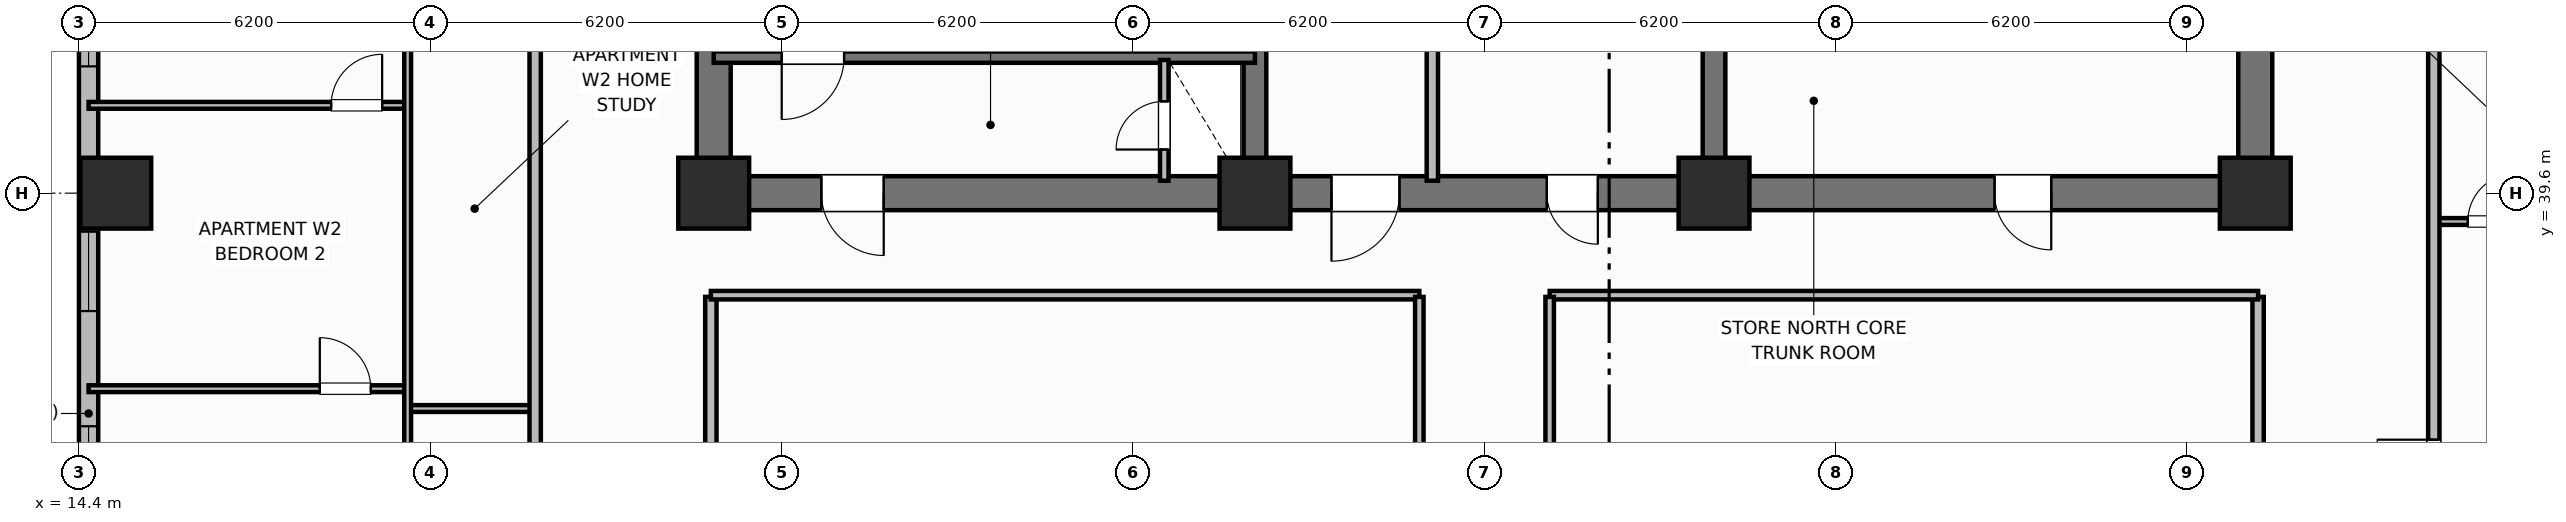
"""IFC4 building model, lengths in metres.
Left out: names, types, materials, properties, quantities, classifications, styles, units other than length and angle.
Written with IfcOpenShell. Run it as: python <this file> out.ifc"""

import sys

from ifc_helpers import new_model, si_unit, direction, frame, frame_2d, origin, origin_2d, place, context, subcontext, project, spatial, rectangle, extrude, element, fill, save


model = new_model("IFC4")
c1 = context("Model", 3, precision=1e-05, world=origin(), true_north=direction((0.0, 1.0)))
c2 = subcontext(c1, "Body", "Model", "MODEL_VIEW")
j1 = project(units=[si_unit("LENGTHUNIT", "METRE"), si_unit("PLANEANGLEUNIT", "RADIAN")], contexts=[c1])
p1 = place(None, origin())
s1 = spatial("IfcSite", under=j1, at=p1, CompositionType="ELEMENT")
p2 = place(p1, origin())
s2 = spatial("IfcBuilding", under=s1, at=p2, CompositionType="ELEMENT")
p3 = place(p2, frame((0.0, 0.0, 28.8)))
s3 = spatial("IfcBuildingStorey", under=s2, at=p3, CompositionType="ELEMENT", Elevation=28.8)
for number, where, z_axis, x_axis in (
    (1, (25.6, 39.9, 0.0), (0.0, 0.0, 1.0), (0.0, 1.0, 0.0)),
    (2, (52.8, 39.9, 0.0), (0.0, 0.0, 1.0), (0.0, 1.0, 0.0)),
):
    element("IfcWall", number, at=place(p3, frame(where, z_axis=z_axis, x_axis=x_axis)), inside=s3, PredefinedType="SHEAR", context=c2, shape_type="SweptSolid", body=[
        extrude(rectangle(XDim=5.6, YDim=0.6, at=frame_2d((2.8, 0.0))), origin(), (0.0, 0.0, 1.0), 3.7),
    ])
p4 = place(p3, frame((52.8, 39.6, 0.0), z_axis=(0.0, 0.0, 1.0), x_axis=(-1.0, 0.0, 0.0)))
e3 = element("IfcWall", 3, at=p4, inside=s3, PredefinedType="SHEAR", context=c2, shape_type="SweptSolid", body=[
    extrude(rectangle(XDim=27.2, YDim=0.6, at=frame_2d((13.6, 0.0))), origin(), (0.0, 0.0, 1.0), 3.7),
])
p5 = place(p4, frame((24.2, 0.0, 0.0)))
e4 = element("IfcOpeningElement", 4, at=p5, cuts=e3, PredefinedType="OPENING", context=c2, shape_type="SweptSolid", body=[
    extrude(rectangle(XDim=1.1, YDim=2.15, at=frame_2d((0.55, 1.075))), frame((0.0, 0.31, 0.0), z_axis=(0.0, -1.0, 0.0), x_axis=(1.0, 0.0, 0.0)), (0.0, 0.0, 1.0), 0.62),
])
p6 = place(p4, frame((15.1, 0.0, 0.0)))
e5 = element("IfcOpeningElement", 5, at=p6, cuts=e3, PredefinedType="OPENING", context=c2, shape_type="SweptSolid", body=[
    extrude(rectangle(XDim=1.2, YDim=2.15, at=frame_2d((0.6, 1.075))), frame((0.0, 0.31, 0.0), z_axis=(0.0, -1.0, 0.0), x_axis=(1.0, 0.0, 0.0)), (0.0, 0.0, 1.0), 0.62),
])
p7 = place(p4, frame((11.6, 0.0, 0.0)))
e6 = element("IfcOpeningElement", 6, at=p7, cuts=e3, PredefinedType="OPENING", context=c2, shape_type="SweptSolid", body=[
    extrude(rectangle(XDim=0.9, YDim=2.1, at=frame_2d((0.45, 1.05))), frame((0.0, 0.31, 0.0), z_axis=(0.0, -1.0, 0.0), x_axis=(1.0, 0.0, 0.0)), (0.0, 0.0, 1.0), 0.62),
])
p8 = place(p4, frame((3.6, 0.0, 0.0)))
e7 = element("IfcOpeningElement", 7, at=p8, cuts=e3, PredefinedType="OPENING", context=c2, shape_type="SweptSolid", body=[
    extrude(rectangle(XDim=1.0, YDim=2.15, at=frame_2d((0.5, 1.075))), frame((0.0, 0.31, 0.0), z_axis=(0.0, -1.0, 0.0), x_axis=(1.0, 0.0, 0.0)), (0.0, 0.0, 1.0), 0.62),
])
for number, where, z_axis, x_axis in (
    (8, (35.15, 39.9, 0.0), (0.0, 0.0, 1.0), (0.0, 1.0, 0.0)),
    (9, (43.25, 39.9, 0.0), (0.0, 0.0, 1.0), (0.0, 1.0, 0.0)),
):
    element("IfcWall", number, at=place(p3, frame(where, z_axis=z_axis, x_axis=x_axis)), inside=s3, PredefinedType="SHEAR", context=c2, shape_type="SweptSolid", body=[
        extrude(rectangle(XDim=5.6, YDim=0.4, at=frame_2d((2.8, 0.0))), origin(), (0.0, 0.0, 1.0), 3.7),
    ])
for number, where, z_axis, x_axis in (
    (10, (25.6, 39.6, 0.0), (0.0, 0.0, 1.0), (1.0, 0.0, 0.0)),
    (11, (35.15, 39.6, 0.0), (0.0, 0.0, 1.0), (1.0, 0.0, 0.0)),
    (12, (43.25, 39.6, 0.0), (0.0, 0.0, 1.0), (1.0, 0.0, 0.0)),
    (13, (52.8, 39.6, 0.0), (0.0, 0.0, 1.0), (1.0, 0.0, 0.0)),
    (14, (15.05, 39.6, 0.0), (0.0, 0.0, 1.0), (1.0, 0.0, 0.0)),
):
    element("IfcColumn", number, at=place(p3, frame(where, z_axis=z_axis, x_axis=x_axis)), inside=s3, PredefinedType="COLUMN", context=c2, shape_type="SweptSolid", body=[
        extrude(rectangle(XDim=1.25, YDim=1.25, at=origin_2d()), origin(), (0.0, 0.0, 1.0), 3.7),
    ])
p9 = place(p3, frame((14.57, 47.4, 0.0), z_axis=(0.0, 0.0, 1.0), x_axis=(0.0, -1.0, 0.0)))
e15 = element("IfcWall", 15, at=p9, inside=s3, PredefinedType="SOLIDWALL", context=c2, shape_type="SweptSolid", body=[
    extrude(rectangle(XDim=14.8, YDim=0.34, at=frame_2d((7.4, 0.0))), origin(), (0.0, 0.0, 1.0), 2.7),
])
p10 = place(p9, frame((3.762, 0.0, 0.73)))
e16 = element("IfcOpeningElement", 16, at=p10, cuts=e15, PredefinedType="OPENING", context=c2, shape_type="SweptSolid", body=[
    extrude(rectangle(XDim=1.8, YDim=1.85, at=frame_2d((0.9, 0.925))), frame((0.0, 0.18, 0.0), z_axis=(0.0, -1.0, 0.0), x_axis=(1.0, 0.0, 0.0)), (0.0, 0.0, 1.0), 0.36),
])
p11 = place(p9, frame((8.48, 0.0, 0.69)))
e17 = element("IfcOpeningElement", 17, at=p11, cuts=e15, PredefinedType="OPENING", context=c2, shape_type="SweptSolid", body=[
    extrude(rectangle(XDim=1.4, YDim=1.85, at=frame_2d((0.7, 0.925))), frame((0.0, 0.18, 0.0), z_axis=(0.0, -1.0, 0.0), x_axis=(1.0, 0.0, 0.0)), (0.0, 0.0, 1.0), 0.36),
])
p12 = place(p9, frame((11.913, 0.0, 0.73)))
e18 = element("IfcOpeningElement", 18, at=p12, cuts=e15, PredefinedType="OPENING", context=c2, shape_type="SweptSolid", body=[
    extrude(rectangle(XDim=1.8, YDim=1.85, at=frame_2d((0.9, 0.925))), frame((0.0, 0.18, 0.0), z_axis=(0.0, -1.0, 0.0), x_axis=(1.0, 0.0, 0.0)), (0.0, 0.0, 1.0), 0.36),
])
p13 = place(p3, frame((35.15, 42.0, 0.0), z_axis=(0.0, 0.0, 1.0), x_axis=(-1.0, 0.0, 0.0)))
e19 = element("IfcWall", 19, at=p13, inside=s3, PredefinedType="SHEAR", context=c2, shape_type="SweptSolid", body=[
    extrude(rectangle(XDim=9.55, YDim=0.2, at=frame_2d((4.775, 0.0))), origin(), (0.0, 0.0, 1.0), 3.7),
])
p14 = place(p13, frame((7.25, 0.0, 0.0)))
e20 = element("IfcOpeningElement", 20, at=p14, cuts=e19, PredefinedType="OPENING", context=c2, shape_type="SweptSolid", body=[
    extrude(rectangle(XDim=1.1, YDim=2.15, at=frame_2d((0.55, 1.075))), frame((0.0, 0.11, 0.0), z_axis=(0.0, -1.0, 0.0), x_axis=(1.0, 0.0, 0.0)), (0.0, 0.0, 1.0), 0.22),
])
p15 = place(p3, frame((33.55, 39.82, 0.0), z_axis=(0.0, 0.0, 1.0), x_axis=(0.0, 1.0, 0.0)))
e21 = element("IfcWall", 21, at=p15, inside=s3, PredefinedType="PARTITIONING", context=c2, shape_type="SweptSolid", body=[
    extrude(rectangle(XDim=2.13, YDim=0.15, at=frame_2d((1.065, 0.0))), origin(), (0.0, 0.0, 1.0), 2.53),
])
p16 = place(p15, frame((0.55, 0.0, 0.0)))
e22 = element("IfcOpeningElement", 22, at=p16, cuts=e21, PredefinedType="OPENING", context=c2, shape_type="SweptSolid", body=[
    extrude(rectangle(XDim=0.85, YDim=2.05, at=frame_2d((0.425, 1.025))), frame((0.0, 0.085, 0.0), z_axis=(0.0, -1.0, 0.0), x_axis=(1.0, 0.0, 0.0)), (0.0, 0.0, 1.0), 0.17),
])
p17 = place(p3, frame((38.28, 39.82, 0.0), z_axis=(0.0, 0.0, 1.0), x_axis=(0.0, 1.0, 0.0)))
e23 = element("IfcWall", 23, at=p17, inside=s3, PredefinedType="PARTITIONING", context=c2, shape_type="SweptSolid", body=[
    extrude(rectangle(XDim=2.73, YDim=0.2, at=frame_2d((1.365, 0.0))), origin(), (0.0, 0.0, 1.0), 2.53),
])
for number, where, z_axis, x_axis in (
    (24, (25.55, 18.63, 0.0), (0.0, 0.0, 1.0), (0.0, 1.0, 0.0)),
    (25, (52.85, 18.63, 0.0), (0.0, 0.0, 1.0), (0.0, 1.0, 0.0)),
):
    element("IfcWall", number, at=place(p3, frame(where, z_axis=z_axis, x_axis=x_axis)), inside=s3, PredefinedType="PARTITIONING", context=c2, shape_type="SweptSolid", body=[
        extrude(rectangle(XDim=19.14, YDim=0.2, at=frame_2d((9.57, 0.0))), origin(), (0.0, 0.0, 1.0), 2.53),
    ])
for number, where, z_axis, x_axis in (
    (26, (25.55, 37.8, 0.0), (0.0, 0.0, 1.0), (1.0, 0.0, 0.0)),
    (27, (40.35, 37.8, 0.0), (0.0, 0.0, 1.0), (1.0, 0.0, 0.0)),
):
    element("IfcWall", number, at=place(p3, frame(where, z_axis=z_axis, x_axis=x_axis)), inside=s3, PredefinedType="PARTITIONING", context=c2, shape_type="SweptSolid", body=[
        extrude(rectangle(XDim=12.5, YDim=0.15, at=frame_2d((6.25, 0.0))), origin(), (0.0, 0.0, 1.0), 2.53),
    ])
p18 = place(p3, frame((38.05, 18.63, 0.0), z_axis=(0.0, 0.0, 1.0), x_axis=(0.0, 1.0, 0.0)))
e28 = element("IfcWall", 28, at=p18, inside=s3, PredefinedType="PARTITIONING", context=c2, shape_type="SweptSolid", body=[
    extrude(rectangle(XDim=19.14, YDim=0.15, at=frame_2d((9.57, 0.0))), origin(), (0.0, 0.0, 1.0), 2.53),
])
p19 = place(p18, frame((5.5, 0.0, 0.0)))
e29 = element("IfcOpeningElement", 29, at=p19, cuts=e28, PredefinedType="OPENING", context=c2, shape_type="SweptSolid", body=[
    extrude(rectangle(XDim=1.0, YDim=2.15, at=frame_2d((0.5, 1.075))), frame((0.0, 0.085, 0.0), z_axis=(0.0, -1.0, 0.0), x_axis=(1.0, 0.0, 0.0)), (0.0, 0.0, 1.0), 0.17),
])
p20 = place(p3, frame((40.35, 18.63, 0.0), z_axis=(0.0, 0.0, 1.0), x_axis=(0.0, 1.0, 0.0)))
e30 = element("IfcWall", 30, at=p20, inside=s3, PredefinedType="PARTITIONING", context=c2, shape_type="SweptSolid", body=[
    extrude(rectangle(XDim=19.14, YDim=0.15, at=frame_2d((9.57, 0.0))), origin(), (0.0, 0.0, 1.0), 2.53),
])
p21 = place(p20, frame((5.5, 0.0, 0.0)))
e31 = element("IfcOpeningElement", 31, at=p21, cuts=e30, PredefinedType="OPENING", context=c2, shape_type="SweptSolid", body=[
    extrude(rectangle(XDim=1.0, YDim=2.15, at=frame_2d((0.5, 1.075))), frame((0.0, 0.085, 0.0), z_axis=(0.0, -1.0, 0.0), x_axis=(1.0, 0.0, 0.0)), (0.0, 0.0, 1.0), 0.17),
])
p22 = place(p3, frame((20.2, 35.8, 0.0), z_axis=(0.0, 0.0, 1.0), x_axis=(1.0, 0.0, 0.0)))
e32 = element("IfcWall", 32, at=p22, inside=s3, PredefinedType="PARTITIONING", context=c2, shape_type="SweptSolid", body=[
    extrude(rectangle(XDim=2.25, YDim=0.12, at=frame_2d((1.125, 0.0))), origin(), (0.0, 0.0, 1.0), 2.53),
])
p23 = place(p3, frame((14.57, 36.15, 0.0), z_axis=(0.0, 0.0, 1.0), x_axis=(1.0, 0.0, 0.0)))
e33 = element("IfcWall", 33, at=p23, inside=s3, PredefinedType="PARTITIONING", context=c2, shape_type="SweptSolid", body=[
    extrude(rectangle(XDim=5.63, YDim=0.12, at=frame_2d((2.815, 0.0))), origin(), (0.0, 0.0, 1.0), 2.53),
])
p24 = place(p23, frame((4.08, 0.0, 0.0)))
e34 = element("IfcOpeningElement", 34, at=p24, cuts=e33, PredefinedType="OPENING", context=c2, shape_type="SweptSolid", body=[
    extrude(rectangle(XDim=0.9, YDim=2.1, at=frame_2d((0.45, 1.05))), frame((0.0, 0.07, 0.0), z_axis=(0.0, -1.0, 0.0), x_axis=(1.0, 0.0, 0.0)), (0.0, 0.0, 1.0), 0.14),
])
p25 = place(p3, frame((14.57, 41.15, 0.0), z_axis=(0.0, 0.0, 1.0), x_axis=(1.0, 0.0, 0.0)))
e35 = element("IfcWall", 35, at=p25, inside=s3, PredefinedType="PARTITIONING", context=c2, shape_type="SweptSolid", body=[
    extrude(rectangle(XDim=5.63, YDim=0.12, at=frame_2d((2.815, 0.0))), origin(), (0.0, 0.0, 1.0), 2.53),
])
p26 = place(p25, frame((4.28, 0.0, 0.0)))
e36 = element("IfcOpeningElement", 36, at=p26, cuts=e35, PredefinedType="OPENING", context=c2, shape_type="SweptSolid", body=[
    extrude(rectangle(XDim=0.9, YDim=2.1, at=frame_2d((0.45, 1.05))), frame((0.0, 0.07, 0.0), z_axis=(0.0, -1.0, 0.0), x_axis=(1.0, 0.0, 0.0)), (0.0, 0.0, 1.0), 0.14),
])
p27 = place(p3, frame((20.2, 26.64, 0.0), z_axis=(0.0, 0.0, 1.0), x_axis=(0.0, 1.0, 0.0)))
e37 = element("IfcWall", 37, at=p27, inside=s3, PredefinedType="PARTITIONING", context=c2, shape_type="SweptSolid", body=[
    extrude(rectangle(XDim=19.12, YDim=0.12, at=frame_2d((9.56, 0.0))), origin(), (0.0, 0.0, 1.0), 2.53),
])
p28 = place(p27, frame((2.81, 0.0, 0.0)))
e38 = element("IfcOpeningElement", 38, at=p28, cuts=e37, PredefinedType="OPENING", context=c2, shape_type="SweptSolid", body=[
    extrude(rectangle(XDim=0.9, YDim=2.1, at=frame_2d((0.45, 1.05))), frame((0.0, 0.07, 0.0), z_axis=(0.0, -1.0, 0.0), x_axis=(1.0, 0.0, 0.0)), (0.0, 0.0, 1.0), 0.14),
])
p29 = place(p27, frame((16.18, 0.0, 0.0)))
e39 = element("IfcOpeningElement", 39, at=p29, cuts=e37, PredefinedType="OPENING", context=c2, shape_type="SweptSolid", body=[
    extrude(rectangle(XDim=0.82, YDim=2.08, at=frame_2d((0.41, 1.04))), frame((0.0, 0.07, 0.0), z_axis=(0.0, -1.0, 0.0), x_axis=(1.0, 0.0, 0.0)), (0.0, 0.0, 1.0), 0.14),
])
p30 = place(p3, frame((22.45, 10.6, 0.0), z_axis=(0.0, 0.0, 1.0), x_axis=(0.0, 1.0, 0.0)))
e40 = element("IfcWall", 40, at=p30, inside=s3, PredefinedType="PARTITIONING", context=c2, shape_type="SweptSolid", body=[
    extrude(rectangle(XDim=35.2, YDim=0.2, at=frame_2d((17.6, 0.0))), origin(), (0.0, 0.0, 1.0), 2.53),
])
p31 = place(p30, frame((2.65, 0.0, 0.0)))
e41 = element("IfcOpeningElement", 41, at=p31, cuts=e40, PredefinedType="OPENING", context=c2, shape_type="SweptSolid", body=[
    extrude(rectangle(XDim=1.0, YDim=2.15, at=frame_2d((0.5, 1.075))), frame((0.0, 0.11, 0.0), z_axis=(0.0, -1.0, 0.0), x_axis=(1.0, 0.0, 0.0)), (0.0, 0.0, 1.0), 0.22),
])
p32 = place(p30, frame((19.95, 0.0, 0.0)))
e42 = element("IfcOpeningElement", 42, at=p32, cuts=e40, PredefinedType="OPENING", context=c2, shape_type="SweptSolid", body=[
    extrude(rectangle(XDim=1.0, YDim=2.15, at=frame_2d((0.5, 1.075))), frame((0.0, 0.11, 0.0), z_axis=(0.0, -1.0, 0.0), x_axis=(1.0, 0.0, 0.0)), (0.0, 0.0, 1.0), 0.22),
])
p33 = place(p3, frame((55.95, 39.1, 0.0), z_axis=(0.0, 0.0, 1.0), x_axis=(1.0, 0.0, 0.0)))
e43 = element("IfcWall", 43, at=p33, inside=s3, PredefinedType="PARTITIONING", context=c2, shape_type="SweptSolid", body=[
    extrude(rectangle(XDim=2.25, YDim=0.12, at=frame_2d((1.125, 0.0))), origin(), (0.0, 0.0, 1.0), 2.53),
])
p34 = place(p33, frame((0.6, 0.0, 0.0)))
e44 = element("IfcOpeningElement", 44, at=p34, cuts=e43, PredefinedType="OPENING", context=c2, shape_type="SweptSolid", body=[
    extrude(rectangle(XDim=0.85, YDim=2.1, at=frame_2d((0.425, 1.05))), frame((0.0, 0.07, 0.0), z_axis=(0.0, -1.0, 0.0), x_axis=(1.0, 0.0, 0.0)), (0.0, 0.0, 1.0), 0.14),
])
p35 = place(p3, frame((55.95, 10.6, 0.0), z_axis=(0.0, 0.0, 1.0), x_axis=(0.0, 1.0, 0.0)))
e45 = element("IfcWall", 45, at=p35, inside=s3, PredefinedType="PARTITIONING", context=c2, shape_type="SweptSolid", body=[
    extrude(rectangle(XDim=35.2, YDim=0.2, at=frame_2d((17.6, 0.0))), origin(), (0.0, 0.0, 1.0), 2.53),
])
p36 = place(p35, frame((2.65, 0.0, 0.0)))
e46 = element("IfcOpeningElement", 46, at=p36, cuts=e45, PredefinedType="OPENING", context=c2, shape_type="SweptSolid", body=[
    extrude(rectangle(XDim=1.0, YDim=2.15, at=frame_2d((0.5, 1.075))), frame((0.0, 0.11, 0.0), z_axis=(0.0, -1.0, 0.0), x_axis=(1.0, 0.0, 0.0)), (0.0, 0.0, 1.0), 0.22),
])
p37 = place(p35, frame((12.518, 0.0, 0.0)))
e47 = element("IfcOpeningElement", 47, at=p37, cuts=e45, PredefinedType="OPENING", context=c2, shape_type="SweptSolid", body=[
    extrude(rectangle(XDim=1.0, YDim=2.15, at=frame_2d((0.5, 1.075))), frame((0.0, 0.11, 0.0), z_axis=(0.0, -1.0, 0.0), x_axis=(1.0, 0.0, 0.0)), (0.0, 0.0, 1.0), 0.22),
])
p38 = place(p35, frame((23.65, 0.0, 0.0)))
e48 = element("IfcOpeningElement", 48, at=p38, cuts=e45, PredefinedType="OPENING", context=c2, shape_type="SweptSolid", body=[
    extrude(rectangle(XDim=1.0, YDim=2.15, at=frame_2d((0.5, 1.075))), frame((0.0, 0.11, 0.0), z_axis=(0.0, -1.0, 0.0), x_axis=(1.0, 0.0, 0.0)), (0.0, 0.0, 1.0), 0.22),
])
p39 = place(p10, origin())
e49 = element("IfcWindow", 49, at=p39, inside=s3, PartitioningType="SINGLE_PANEL", PredefinedType="WINDOW", context=c2, shape_type="SweptSolid", body=[
    extrude(rectangle(XDim=1.8, YDim=1.85, at=frame_2d((0.9, 0.925))), frame((0.0, 0.03, 0.0), z_axis=(0.0, -1.0, 0.0), x_axis=(1.0, 0.0, 0.0)), (0.0, 0.0, 1.0), 0.06),
])
fill(e16, e49)
p40 = place(p11, origin())
e50 = element("IfcWindow", 50, at=p40, inside=s3, PartitioningType="SINGLE_PANEL", PredefinedType="WINDOW", context=c2, shape_type="SweptSolid", body=[
    extrude(rectangle(XDim=1.4, YDim=1.85, at=frame_2d((0.7, 0.925))), frame((0.0, 0.03, 0.0), z_axis=(0.0, -1.0, 0.0), x_axis=(1.0, 0.0, 0.0)), (0.0, 0.0, 1.0), 0.06),
])
fill(e17, e50)
p41 = place(p12, origin())
e51 = element("IfcWindow", 51, at=p41, inside=s3, PartitioningType="SINGLE_PANEL", PredefinedType="WINDOW", context=c2, shape_type="SweptSolid", body=[
    extrude(rectangle(XDim=1.8, YDim=1.85, at=frame_2d((0.9, 0.925))), frame((0.0, 0.03, 0.0), z_axis=(0.0, -1.0, 0.0), x_axis=(1.0, 0.0, 0.0)), (0.0, 0.0, 1.0), 0.06),
])
fill(e18, e51)
p42 = place(p14, origin())
e52 = element("IfcDoor", 52, at=p42, inside=s3, OperationType="SINGLE_SWING_RIGHT", PredefinedType="DOOR", context=c2, shape_type="SweptSolid", body=[
    extrude(rectangle(XDim=1.1, YDim=2.15, at=frame_2d((0.55, 1.075))), frame((0.0, 0.025, 0.0), z_axis=(0.0, -1.0, 0.0), x_axis=(1.0, 0.0, 0.0)), (0.0, 0.0, 1.0), 0.05),
])
fill(e20, e52)
p43 = place(p16, origin())
e53 = element("IfcDoor", 53, at=p43, inside=s3, OperationType="SINGLE_SWING_LEFT", PredefinedType="TRAPDOOR", context=c2, shape_type="SweptSolid", body=[
    extrude(rectangle(XDim=0.85, YDim=2.05, at=frame_2d((0.425, 1.025))), frame((0.0, 0.025, 0.0), z_axis=(0.0, -1.0, 0.0), x_axis=(1.0, 0.0, 0.0)), (0.0, 0.0, 1.0), 0.05),
])
fill(e22, e53)
p44 = place(p24, origin())
e54 = element("IfcDoor", 54, at=p44, inside=s3, OperationType="SINGLE_SWING_LEFT", PredefinedType="DOOR", context=c2, shape_type="SweptSolid", body=[
    extrude(rectangle(XDim=0.9, YDim=2.1, at=frame_2d((0.45, 1.05))), frame((0.0, 0.025, 0.0), z_axis=(0.0, -1.0, 0.0), x_axis=(1.0, 0.0, 0.0)), (0.0, 0.0, 1.0), 0.05),
])
fill(e34, e54)
p45 = place(p26, origin())
e55 = element("IfcDoor", 55, at=p45, inside=s3, OperationType="SINGLE_SWING_RIGHT", PredefinedType="DOOR", context=c2, shape_type="SweptSolid", body=[
    extrude(rectangle(XDim=0.9, YDim=2.1, at=frame_2d((0.45, 1.05))), frame((0.0, 0.025, 0.0), z_axis=(0.0, -1.0, 0.0), x_axis=(1.0, 0.0, 0.0)), (0.0, 0.0, 1.0), 0.05),
])
fill(e36, e55)
p46 = place(p34, origin())
e56 = element("IfcDoor", 56, at=p46, inside=s3, OperationType="SINGLE_SWING_RIGHT", PredefinedType="DOOR", context=c2, shape_type="SweptSolid", body=[
    extrude(rectangle(XDim=0.85, YDim=2.1, at=frame_2d((0.425, 1.05))), frame((0.0, 0.025, 0.0), z_axis=(0.0, -1.0, 0.0), x_axis=(1.0, 0.0, 0.0)), (0.0, 0.0, 1.0), 0.05),
])
fill(e44, e56)
p47 = place(p38, origin())
e57 = element("IfcDoor", 57, at=p47, inside=s3, OperationType="SINGLE_SWING_RIGHT", PredefinedType="DOOR", context=c2, shape_type="SweptSolid", body=[
    extrude(rectangle(XDim=1.0, YDim=2.15, at=frame_2d((0.5, 1.075))), frame((0.0, 0.025, 0.0), z_axis=(0.0, -1.0, 0.0), x_axis=(1.0, 0.0, 0.0)), (0.0, 0.0, 1.0), 0.05),
])
fill(e48, e57)
p48 = place(p5, origin())
e58 = element("IfcDoor", 58, at=p48, inside=s3, OperationType="SINGLE_SWING_LEFT", PredefinedType="DOOR", context=c2, shape_type="SweptSolid", body=[
    extrude(rectangle(XDim=1.1, YDim=2.15, at=frame_2d((0.55, 1.075))), frame((0.0, 0.025, 0.0), z_axis=(0.0, -1.0, 0.0), x_axis=(1.0, 0.0, 0.0)), (0.0, 0.0, 1.0), 0.05),
])
fill(e4, e58)
p49 = place(p6, origin())
e59 = element("IfcDoor", 59, at=p49, inside=s3, OperationType="SINGLE_SWING_RIGHT", PredefinedType="DOOR", context=c2, shape_type="SweptSolid", body=[
    extrude(rectangle(XDim=1.2, YDim=2.15, at=frame_2d((0.6, 1.075))), frame((0.0, 0.025, 0.0), z_axis=(0.0, -1.0, 0.0), x_axis=(1.0, 0.0, 0.0)), (0.0, 0.0, 1.0), 0.05),
])
fill(e5, e59)
p50 = place(p7, origin())
e60 = element("IfcDoor", 60, at=p50, inside=s3, OperationType="SINGLE_SWING_LEFT", PredefinedType="DOOR", context=c2, shape_type="SweptSolid", body=[
    extrude(rectangle(XDim=0.9, YDim=2.1, at=frame_2d((0.45, 1.05))), frame((0.0, 0.025, 0.0), z_axis=(0.0, -1.0, 0.0), x_axis=(1.0, 0.0, 0.0)), (0.0, 0.0, 1.0), 0.05),
])
fill(e6, e60)
p51 = place(p8, origin())
e61 = element("IfcDoor", 61, at=p51, inside=s3, OperationType="SINGLE_SWING_LEFT", PredefinedType="DOOR", context=c2, shape_type="SweptSolid", body=[
    extrude(rectangle(XDim=1.0, YDim=2.15, at=frame_2d((0.5, 1.075))), frame((0.0, 0.025, 0.0), z_axis=(0.0, -1.0, 0.0), x_axis=(1.0, 0.0, 0.0)), (0.0, 0.0, 1.0), 0.05),
])
fill(e7, e61)
save(model, sys.argv[1])
